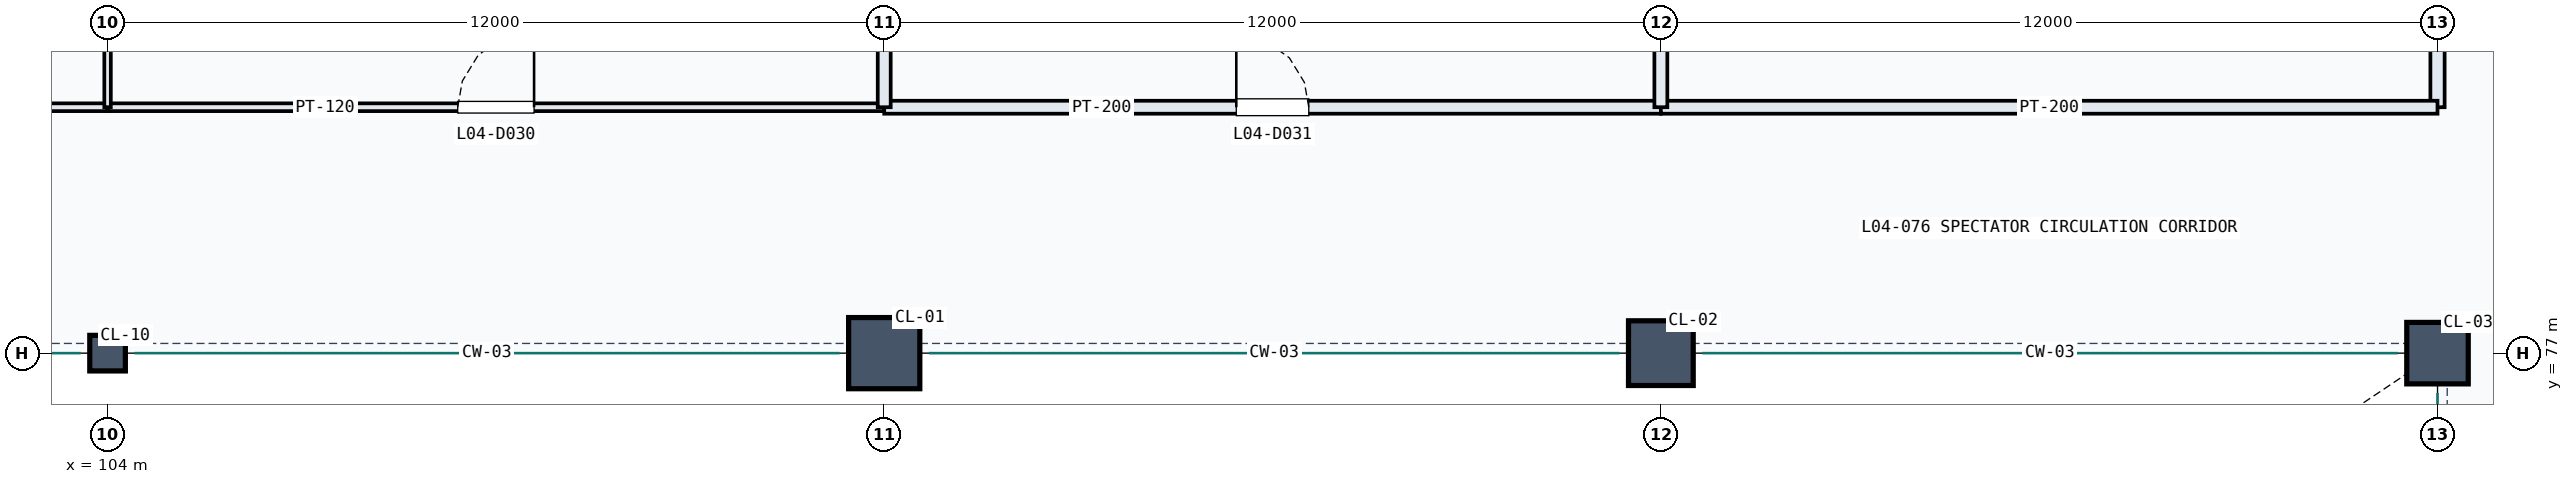
"""IFC4 building model, lengths in metres.
Left out: names, types, materials, properties, quantities, classifications, styles, units other than length and angle.
Written with IfcOpenShell. Run it as: python <this file> out.ifc"""

import sys

from ifc_helpers import new_model, si_unit, direction, frame, frame_2d, origin, origin_2d, place, context, subcontext, project, spatial, rectangle, extrude, element, fill, save


model = new_model("IFC4")
c1 = context("Model", 3, precision=1e-05, world=origin(), true_north=direction((0.0, 1.0)))
c2 = subcontext(c1, "Body", "Model", "MODEL_VIEW")
j1 = project(units=[si_unit("LENGTHUNIT", "METRE"), si_unit("PLANEANGLEUNIT", "RADIAN")], contexts=[c1])
p1 = place(None, origin())
s1 = spatial("IfcSite", under=j1, at=p1, CompositionType="ELEMENT")
p2 = place(p1, origin())
s2 = spatial("IfcBuilding", under=s1, at=p2, CompositionType="ELEMENT")
p3 = place(p2, frame((0.0, 0.0, 19.5)))
s3 = spatial("IfcBuildingStorey", under=s2, at=p3, CompositionType="ELEMENT", Elevation=19.5)
p4 = place(p3, frame((104.0, 77.0, 0.0), z_axis=(0.0, 0.0, 1.0), x_axis=(1.0, 0.0, 0.0)))
e1 = element("IfcColumn", 1, at=p4, inside=s3, PredefinedType="COLUMN", context=c2, shape_type="SweptSolid", body=[
    extrude(rectangle(XDim=0.55, YDim=0.55, at=origin_2d()), origin(), (0.0, 0.0, 1.0), 4.8),
])
p5 = place(p3, frame((116.0, 77.0, 0.0), z_axis=(0.0, 0.0, 1.0), x_axis=(1.0, 0.0, 0.0)))
e2 = element("IfcColumn", 2, at=p5, inside=s3, PredefinedType="COLUMN", context=c2, shape_type="SweptSolid", body=[
    extrude(rectangle(XDim=1.1, YDim=1.1, at=origin_2d()), origin(), (0.0, 0.0, 1.0), 4.8),
])
p6 = place(p3, frame((128.0, 77.0, 0.0), z_axis=(0.0, 0.0, 1.0), x_axis=(1.0, 0.0, 0.0)))
e3 = element("IfcColumn", 3, at=p6, inside=s3, PredefinedType="COLUMN", context=c2, shape_type="SweptSolid", body=[
    extrude(rectangle(XDim=1.0, YDim=1.0, at=origin_2d()), origin(), (0.0, 0.0, 1.0), 4.8),
])
p7 = place(p3, frame((140.0, 77.0, 0.0), z_axis=(0.0, 0.0, 1.0), x_axis=(1.0, 0.0, 0.0)))
e4 = element("IfcColumn", 4, at=p7, inside=s3, PredefinedType="COLUMN", context=c2, shape_type="SweptSolid", body=[
    extrude(rectangle(XDim=0.95, YDim=0.95, at=origin_2d()), origin(), (0.0, 0.0, 1.0), 4.8),
])
p8 = place(p3, frame((140.0, 80.8, 0.0), z_axis=(0.0, 0.0, 1.0), x_axis=(0.0, 1.0, 0.0)))
e5 = element("IfcWall", 5, at=p8, inside=s3, PredefinedType="PARTITIONING", context=c2, shape_type="SweptSolid", body=[
    extrude(rectangle(XDim=6.98, YDim=0.22, at=frame_2d((3.49, 0.0))), origin(), (0.0, 0.0, 1.0), 3.49),
])
p9 = place(p8, frame((2.96, 0.0, 0.0)))
e6 = element("IfcOpeningElement", 6, at=p9, cuts=e5, PredefinedType="OPENING", context=c2, shape_type="SweptSolid", body=[
    extrude(rectangle(XDim=1.06, YDim=2.3, at=frame_2d((0.53, 1.15))), frame((0.0, 0.12, 0.0), z_axis=(0.0, -1.0, 0.0), x_axis=(1.0, 0.0, 0.0)), (0.0, 0.0, 1.0), 0.24),
])
p10 = place(p3, frame((94.0, 80.8, 0.0), z_axis=(0.0, 0.0, 1.0), x_axis=(1.0, 0.0, 0.0)))
e7 = element("IfcWall", 7, at=p10, inside=s3, PredefinedType="PARTITIONING", context=c2, shape_type="SweptSolid", body=[
    extrude(rectangle(XDim=10.0, YDim=0.12, at=frame_2d((5.0, 0.0))), origin(), (0.0, 0.0, 1.0), 3.49),
])
p11 = place(p10, frame((4.45, 0.0, 0.0)))
e8 = element("IfcOpeningElement", 8, at=p11, cuts=e7, PredefinedType="OPENING", context=c2, shape_type="SweptSolid", body=[
    extrude(rectangle(XDim=1.1, YDim=2.1, at=frame_2d((0.55, 1.05))), frame((0.0, 0.07, 0.0), z_axis=(0.0, -1.0, 0.0), x_axis=(1.0, 0.0, 0.0)), (0.0, 0.0, 1.0), 0.14),
])
p12 = place(p3, frame((104.0, 80.8, 0.0), z_axis=(0.0, 0.0, 1.0), x_axis=(1.0, 0.0, 0.0)))
e9 = element("IfcWall", 9, at=p12, inside=s3, PredefinedType="PARTITIONING", context=c2, shape_type="SweptSolid", body=[
    extrude(rectangle(XDim=12.0, YDim=0.12, at=frame_2d((6.0, 0.0))), origin(), (0.0, 0.0, 1.0), 3.64),
])
p13 = place(p12, frame((5.41, 0.0, 0.0)))
e10 = element("IfcOpeningElement", 10, at=p13, cuts=e9, PredefinedType="OPENING", context=c2, shape_type="SweptSolid", body=[
    extrude(rectangle(XDim=1.18, YDim=2.15, at=frame_2d((0.59, 1.075))), frame((0.0, 0.07, 0.0), z_axis=(0.0, -1.0, 0.0), x_axis=(1.0, 0.0, 0.0)), (0.0, 0.0, 1.0), 0.14),
])
p14 = place(p3, frame((116.0, 80.8, 0.0), z_axis=(0.0, 0.0, 1.0), x_axis=(1.0, 0.0, 0.0)))
e11 = element("IfcWall", 11, at=p14, inside=s3, PredefinedType="PARTITIONING", context=c2, shape_type="SweptSolid", body=[
    extrude(rectangle(XDim=12.0, YDim=0.2, at=frame_2d((6.0, 0.0))), origin(), (0.0, 0.0, 1.0), 3.707),
])
p15 = place(p14, frame((5.44, 0.0, 0.0)))
e12 = element("IfcOpeningElement", 12, at=p15, cuts=e11, PredefinedType="OPENING", context=c2, shape_type="SweptSolid", body=[
    extrude(rectangle(XDim=1.12, YDim=2.25, at=frame_2d((0.56, 1.125))), frame((0.0, 0.11, 0.0), z_axis=(0.0, -1.0, 0.0), x_axis=(1.0, 0.0, 0.0)), (0.0, 0.0, 1.0), 0.22),
])
p16 = place(p3, frame((128.0, 80.8, 0.0), z_axis=(0.0, 0.0, 1.0), x_axis=(1.0, 0.0, 0.0)))
e13 = element("IfcWall", 13, at=p16, inside=s3, PredefinedType="PARTITIONING", context=c2, shape_type="SweptSolid", body=[
    extrude(rectangle(XDim=12.0, YDim=0.2, at=frame_2d((6.0, 0.0))), origin(), (0.0, 0.0, 1.0), 3.49),
])
p17 = place(p3, frame((104.0, 80.8, 0.0), z_axis=(0.0, 0.0, 1.0), x_axis=(0.0, 1.0, 0.0)))
e14 = element("IfcWall", 14, at=p17, inside=s3, PredefinedType="PARTITIONING", context=c2, shape_type="SweptSolid", body=[
    extrude(rectangle(XDim=14.015, YDim=0.1, at=frame_2d((7.008, 0.0))), origin(), (0.0, 0.0, 1.0), 3.64),
])
p18 = place(p3, frame((116.0, 80.8, 0.0), z_axis=(0.0, 0.0, 1.0), x_axis=(0.0, 1.0, 0.0)))
e15 = element("IfcWall", 15, at=p18, inside=s3, PredefinedType="PARTITIONING", context=c2, shape_type="SweptSolid", body=[
    extrude(rectangle(XDim=15.184, YDim=0.2, at=frame_2d((7.592, 0.0))), origin(), (0.0, 0.0, 1.0), 3.707),
])
p19 = place(p3, frame((128.0, 80.8, 0.0), z_axis=(0.0, 0.0, 1.0), x_axis=(0.0, 1.0, 0.0)))
e16 = element("IfcWall", 16, at=p19, inside=s3, PredefinedType="PARTITIONING", context=c2, shape_type="SweptSolid", body=[
    extrude(rectangle(XDim=14.488, YDim=0.2, at=frame_2d((7.244, 0.0))), origin(), (0.0, 0.0, 1.0), 3.79),
])
p20 = place(p13, origin())
e17 = element("IfcDoor", 17, at=p20, inside=s3, OperationType="SINGLE_SWING_RIGHT", PredefinedType="DOOR", context=c2, shape_type="SweptSolid", body=[
    extrude(rectangle(XDim=1.18, YDim=2.15, at=frame_2d((0.59, 1.075))), frame((0.0, 0.025, 0.0), z_axis=(0.0, -1.0, 0.0), x_axis=(1.0, 0.0, 0.0)), (0.0, 0.0, 1.0), 0.05),
])
fill(e10, e17)
p21 = place(p15, origin())
e18 = element("IfcDoor", 18, at=p21, inside=s3, OperationType="SINGLE_SWING_LEFT", PredefinedType="DOOR", context=c2, shape_type="SweptSolid", body=[
    extrude(rectangle(XDim=1.12, YDim=2.25, at=frame_2d((0.56, 1.125))), frame((0.0, 0.025, 0.0), z_axis=(0.0, -1.0, 0.0), x_axis=(1.0, 0.0, 0.0)), (0.0, 0.0, 1.0), 0.05),
])
fill(e12, e18)
save(model, sys.argv[1])
